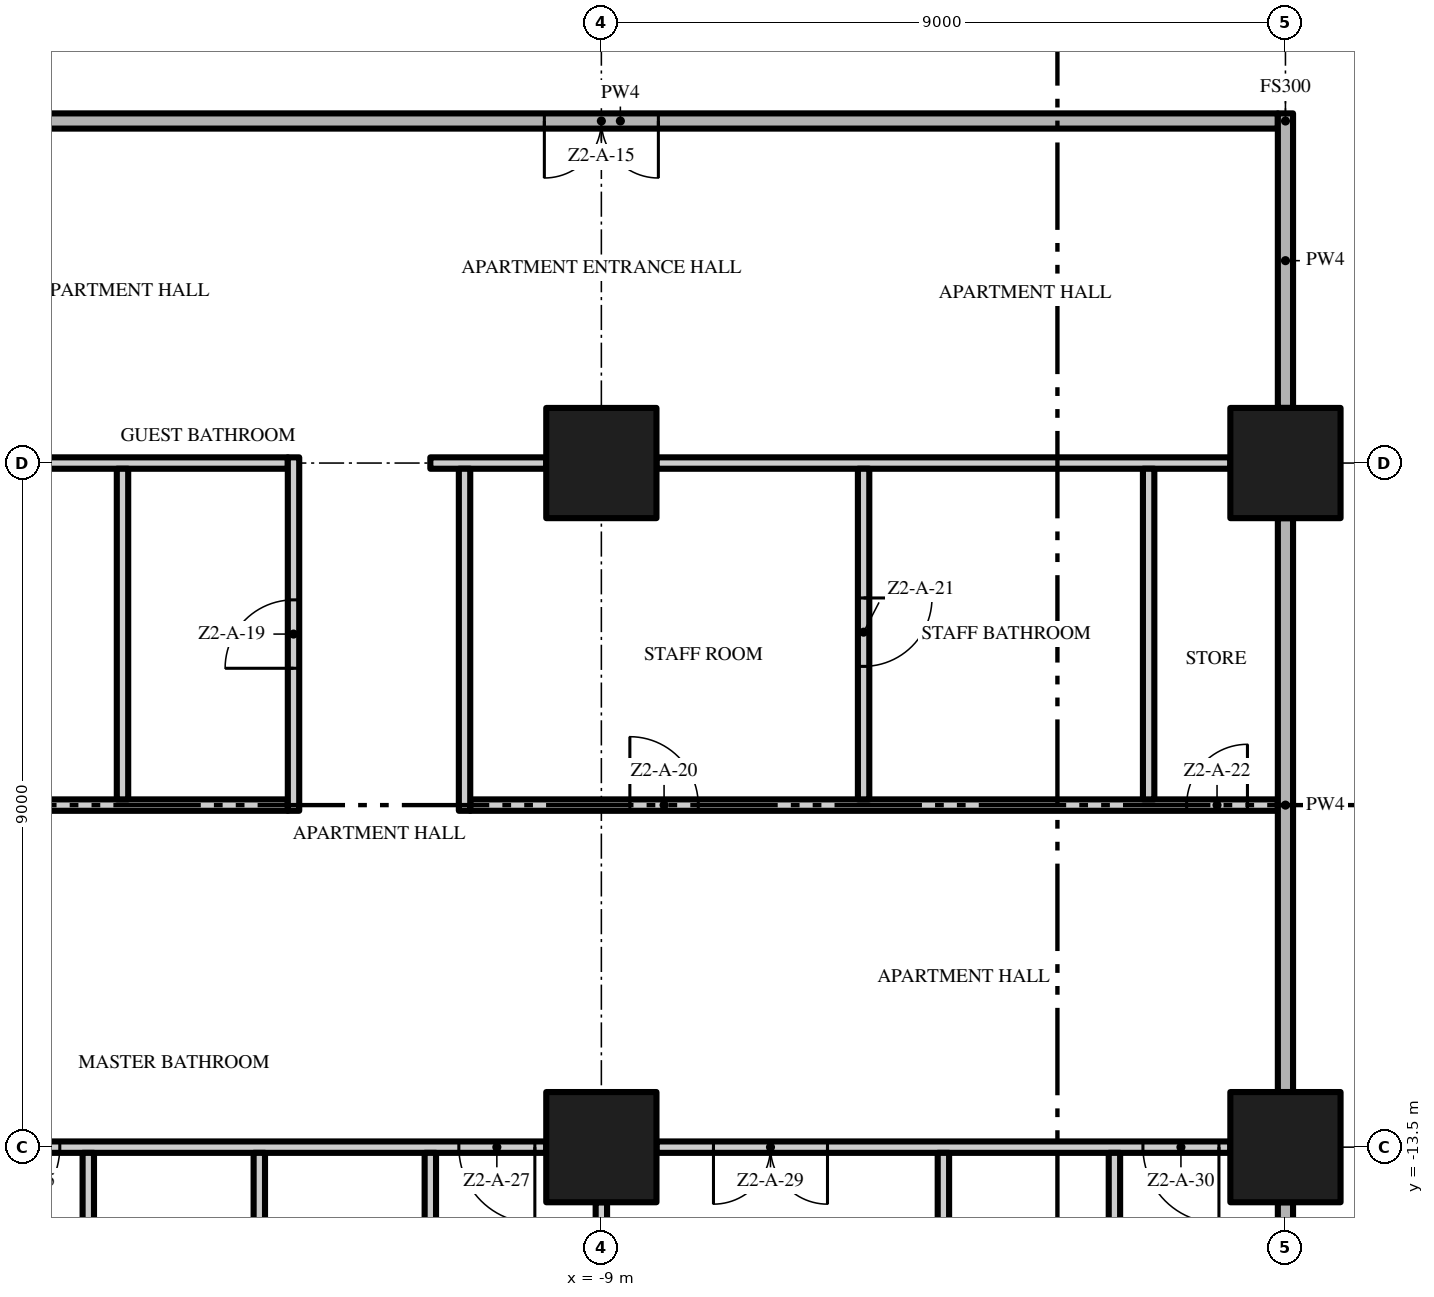
"""IFC4 building model, lengths in metres.
Left out: names, types, materials, properties, quantities, classifications, styles, units other than length and angle.
Written with IfcOpenShell. Run it as: python <this file> out.ifc"""

import sys

from ifc_helpers import new_model, si_unit, direction, frame, frame_2d, origin, origin_2d, place, context, subcontext, project, spatial, rectangle, extrude, element, fill, save


model = new_model("IFC4")
c1 = context("Model", 3, precision=1e-05, world=origin(), true_north=direction((0.0, 1.0)))
c2 = subcontext(c1, "Body", "Model", "MODEL_VIEW")
j1 = project(units=[si_unit("LENGTHUNIT", "METRE"), si_unit("PLANEANGLEUNIT", "RADIAN")], contexts=[c1])
p1 = place(None, origin())
s1 = spatial("IfcSite", under=j1, at=p1, CompositionType="ELEMENT")
p2 = place(p1, origin())
s2 = spatial("IfcBuilding", under=s1, at=p2, CompositionType="ELEMENT")
p3 = place(p2, frame((0.0, 0.0, 69.4)))
s3 = spatial("IfcBuildingStorey", under=s2, at=p3, CompositionType="ELEMENT", Elevation=69.4)
for number, where, z_axis, x_axis in (
    (1, (-9.0, -13.5, 0.0), (0.0, 0.0, 1.0), (1.0, 0.0, 0.0)),
    (2, (-9.0, -4.5, 0.0), (0.0, 0.0, 1.0), (1.0, 0.0, 0.0)),
    (3, (0.0, -13.5, 0.0), (0.0, 0.0, 1.0), (1.0, 0.0, 0.0)),
    (4, (0.0, -4.5, 0.0), (0.0, 0.0, 1.0), (1.0, 0.0, 0.0)),
):
    element("IfcColumn", number, at=place(p3, frame(where, z_axis=z_axis, x_axis=x_axis)), inside=s3, PredefinedType="COLUMN", context=c2, shape_type="SweptSolid", body=[
        extrude(rectangle(XDim=1.45, YDim=1.45, at=origin_2d()), origin(), (0.0, 0.0, 1.0), 3.5),
    ])
p4 = place(p3, frame((-9.725, -13.5, 0.0), z_axis=(0.0, 0.0, 1.0), x_axis=(-1.0, 0.0, 0.0)))
e5 = element("IfcWall", 5, at=p4, inside=s3, PredefinedType="PARTITIONING", context=c2, shape_type="SweptSolid", body=[
    extrude(rectangle(XDim=7.55, YDim=0.15, at=frame_2d((3.775, 0.0))), origin(), (0.0, 0.0, 1.0), 3.5),
])
p5 = place(p4, frame((6.4, 0.0, 0.0)))
e6 = element("IfcOpeningElement", 6, at=p5, cuts=e5, PredefinedType="OPENING", context=c2, shape_type="SweptSolid", body=[
    extrude(rectangle(XDim=1.0, YDim=2.4, at=frame_2d((0.5, 1.2))), frame((0.0, 0.085, 0.0), z_axis=(0.0, -1.0, 0.0), x_axis=(1.0, 0.0, 0.0)), (0.0, 0.0, 1.0), 0.17),
])
p6 = place(p4, frame((0.15, 0.0, 0.0)))
e7 = element("IfcOpeningElement", 7, at=p6, cuts=e5, PredefinedType="OPENING", context=c2, shape_type="SweptSolid", body=[
    extrude(rectangle(XDim=1.0, YDim=2.4, at=frame_2d((0.5, 1.2))), frame((0.0, 0.085, 0.0), z_axis=(0.0, -1.0, 0.0), x_axis=(1.0, 0.0, 0.0)), (0.0, 0.0, 1.0), 0.17),
])
p7 = place(p3, frame((-0.725, -13.5, 0.0), z_axis=(0.0, 0.0, 1.0), x_axis=(-1.0, 0.0, 0.0)))
e8 = element("IfcWall", 8, at=p7, inside=s3, PredefinedType="PARTITIONING", context=c2, shape_type="SweptSolid", body=[
    extrude(rectangle(XDim=7.55, YDim=0.15, at=frame_2d((3.775, 0.0))), origin(), (0.0, 0.0, 1.0), 3.5),
])
p8 = place(p7, frame((5.3, 0.0, 0.0)))
e9 = element("IfcOpeningElement", 9, at=p8, cuts=e8, PredefinedType="OPENING", context=c2, shape_type="SweptSolid", body=[
    extrude(rectangle(XDim=1.5, YDim=2.4, at=frame_2d((0.75, 1.2))), frame((0.0, 0.085, 0.0), z_axis=(0.0, -1.0, 0.0), x_axis=(1.0, 0.0, 0.0)), (0.0, 0.0, 1.0), 0.17),
])
p9 = place(p7, frame((0.15, 0.0, 0.0)))
e10 = element("IfcOpeningElement", 10, at=p9, cuts=e8, PredefinedType="OPENING", context=c2, shape_type="SweptSolid", body=[
    extrude(rectangle(XDim=1.0, YDim=2.4, at=frame_2d((0.5, 1.2))), frame((0.0, 0.085, 0.0), z_axis=(0.0, -1.0, 0.0), x_axis=(1.0, 0.0, 0.0)), (0.0, 0.0, 1.0), 0.17),
])
p10 = place(p3, frame((-26.7, -9.0, 0.0), z_axis=(0.0, 0.0, 1.0), x_axis=(1.0, 0.0, 0.0)))
e11 = element("IfcWall", 11, at=p10, inside=s3, PredefinedType="PARTITIONING", context=c2, shape_type="SweptSolid", body=[
    extrude(rectangle(XDim=13.575, YDim=0.15, at=frame_2d((6.787, 0.0))), origin(), (0.0, 0.0, 1.0), 3.5),
])
p11 = place(p3, frame((-10.725, -9.0, 0.0), z_axis=(0.0, 0.0, 1.0), x_axis=(1.0, 0.0, 0.0)))
e12 = element("IfcWall", 12, at=p11, inside=s3, PredefinedType="PARTITIONING", context=c2, shape_type="SweptSolid", body=[
    extrude(rectangle(XDim=10.625, YDim=0.15, at=frame_2d((5.312, 0.0))), origin(), (0.0, 0.0, 1.0), 3.5),
])
p12 = place(p11, frame((2.1, 0.0, 0.0)))
e13 = element("IfcOpeningElement", 13, at=p12, cuts=e12, PredefinedType="OPENING", context=c2, shape_type="SweptSolid", body=[
    extrude(rectangle(XDim=0.9, YDim=2.1, at=frame_2d((0.45, 1.05))), frame((0.0, 0.085, 0.0), z_axis=(0.0, -1.0, 0.0), x_axis=(1.0, 0.0, 0.0)), (0.0, 0.0, 1.0), 0.17),
])
p13 = place(p11, frame((9.425, 0.0, 0.0)))
e14 = element("IfcOpeningElement", 14, at=p13, cuts=e12, PredefinedType="OPENING", context=c2, shape_type="SweptSolid", body=[
    extrude(rectangle(XDim=0.8, YDim=2.0, at=frame_2d((0.4, 1.0))), frame((0.0, 0.085, 0.0), z_axis=(0.0, -1.0, 0.0), x_axis=(1.0, 0.0, 0.0)), (0.0, 0.0, 1.0), 0.17),
])
p14 = place(p3, frame((-17.275, -4.5, 0.0), z_axis=(0.0, 0.0, 1.0), x_axis=(1.0, 0.0, 0.0)))
e15 = element("IfcWall", 15, at=p14, inside=s3, PredefinedType="PARTITIONING", context=c2, shape_type="SweptSolid", body=[
    extrude(rectangle(XDim=4.15, YDim=0.15, at=frame_2d((2.075, 0.0))), origin(), (0.0, 0.0, 1.0), 3.5),
])
p15 = place(p3, frame((-11.25, -4.5, 0.0), z_axis=(0.0, 0.0, 1.0), x_axis=(1.0, 0.0, 0.0)))
e16 = element("IfcWall", 16, at=p15, inside=s3, PredefinedType="PARTITIONING", context=c2, shape_type="SweptSolid", body=[
    extrude(rectangle(XDim=1.525, YDim=0.15, at=frame_2d((0.762, 0.0))), origin(), (0.0, 0.0, 1.0), 3.5),
])
p16 = place(p3, frame((-8.275, -4.5, 0.0), z_axis=(0.0, 0.0, 1.0), x_axis=(1.0, 0.0, 0.0)))
e17 = element("IfcWall", 17, at=p16, inside=s3, PredefinedType="PARTITIONING", context=c2, shape_type="SweptSolid", body=[
    extrude(rectangle(XDim=7.55, YDim=0.15, at=frame_2d((3.775, 0.0))), origin(), (0.0, 0.0, 1.0), 3.5),
])
p17 = place(p3, frame((-0.1, 0.0, 0.0), z_axis=(0.0, 0.0, 1.0), x_axis=(-1.0, 0.0, 0.0)))
e18 = element("IfcWall", 18, at=p17, inside=s3, PredefinedType="PARTITIONING", context=c2, shape_type="SweptSolid", body=[
    extrude(rectangle(XDim=17.3, YDim=0.2, at=frame_2d((8.65, 0.0))), origin(), (0.0, 0.0, 1.0), 3.5),
])
p18 = place(p17, frame((8.15, 0.0, 0.0)))
e19 = element("IfcOpeningElement", 19, at=p18, cuts=e18, PredefinedType="OPENING", context=c2, shape_type="SweptSolid", body=[
    extrude(rectangle(XDim=1.5, YDim=2.4, at=frame_2d((0.75, 1.2))), frame((0.0, 0.11, 0.0), z_axis=(0.0, -1.0, 0.0), x_axis=(1.0, 0.0, 0.0)), (0.0, 0.0, 1.0), 0.22),
])
p19 = place(p3, frame((-15.75, -16.575, 0.0), z_axis=(0.0, 0.0, 1.0), x_axis=(0.0, 1.0, 0.0)))
e20 = element("IfcWall", 20, at=p19, inside=s3, PredefinedType="PARTITIONING", context=c2, shape_type="SweptSolid", body=[
    extrude(rectangle(XDim=3.0, YDim=0.15, at=frame_2d((1.5, 0.0))), origin(), (0.0, 0.0, 1.0), 3.5),
])
p20 = place(p3, frame((-15.3, -8.925, 0.0), z_axis=(0.0, 0.0, 1.0), x_axis=(0.0, 1.0, 0.0)))
e21 = element("IfcWall", 21, at=p20, inside=s3, PredefinedType="PARTITIONING", context=c2, shape_type="SweptSolid", body=[
    extrude(rectangle(XDim=4.35, YDim=0.15, at=frame_2d((2.175, 0.0))), origin(), (0.0, 0.0, 1.0), 3.5),
])
p21 = place(p3, frame((-13.5, -22.2, 0.0), z_axis=(0.0, 0.0, 1.0), x_axis=(0.0, 1.0, 0.0)))
e22 = element("IfcWall", 22, at=p21, inside=s3, PredefinedType="PARTITIONING", context=c2, shape_type="SweptSolid", body=[
    extrude(rectangle(XDim=8.625, YDim=0.15, at=frame_2d((4.312, 0.0))), origin(), (0.0, 0.0, 1.0), 3.5),
])
p22 = place(p3, frame((-13.05, -9.075, 0.0), z_axis=(0.0, 0.0, 1.0), x_axis=(0.0, 1.0, 0.0)))
e23 = element("IfcWall", 23, at=p22, inside=s3, PredefinedType="PARTITIONING", context=c2, shape_type="SweptSolid", body=[
    extrude(rectangle(XDim=4.65, YDim=0.15, at=frame_2d((2.325, 0.0))), origin(), (0.0, 0.0, 1.0), 3.5),
])
p23 = place(p22, frame((1.875, 0.0, 0.0)))
e24 = element("IfcOpeningElement", 24, at=p23, cuts=e23, PredefinedType="OPENING", context=c2, shape_type="SweptSolid", body=[
    extrude(rectangle(XDim=0.9, YDim=2.1, at=frame_2d((0.45, 1.05))), frame((0.0, 0.085, 0.0), z_axis=(0.0, -1.0, 0.0), x_axis=(1.0, 0.0, 0.0)), (0.0, 0.0, 1.0), 0.17),
])
p24 = place(p3, frame((-11.25, -16.575, 0.0), z_axis=(0.0, 0.0, 1.0), x_axis=(0.0, 1.0, 0.0)))
e25 = element("IfcWall", 25, at=p24, inside=s3, PredefinedType="PARTITIONING", context=c2, shape_type="SweptSolid", body=[
    extrude(rectangle(XDim=3.0, YDim=0.15, at=frame_2d((1.5, 0.0))), origin(), (0.0, 0.0, 1.0), 3.5),
])
p25 = place(p3, frame((-10.8, -9.075, 0.0), z_axis=(0.0, 0.0, 1.0), x_axis=(0.0, 1.0, 0.0)))
e26 = element("IfcWall", 26, at=p25, inside=s3, PredefinedType="PARTITIONING", context=c2, shape_type="SweptSolid", body=[
    extrude(rectangle(XDim=4.5, YDim=0.15, at=frame_2d((2.25, 0.0))), origin(), (0.0, 0.0, 1.0), 3.5),
])
p26 = place(p3, frame((-9.0, -21.15, 0.0), z_axis=(0.0, 0.0, 1.0), x_axis=(0.0, 1.0, 0.0)))
e27 = element("IfcWall", 27, at=p26, inside=s3, PredefinedType="PARTITIONING", context=c2, shape_type="SweptSolid", body=[
    extrude(rectangle(XDim=6.925, YDim=0.15, at=frame_2d((3.462, 0.0))), origin(), (0.0, 0.0, 1.0), 3.5),
])
p27 = place(p3, frame((-5.55, -4.575, 0.0), z_axis=(0.0, 0.0, 1.0), x_axis=(0.0, -1.0, 0.0)))
e28 = element("IfcWall", 28, at=p27, inside=s3, PredefinedType="PARTITIONING", context=c2, shape_type="SweptSolid", body=[
    extrude(rectangle(XDim=4.35, YDim=0.15, at=frame_2d((2.175, 0.0))), origin(), (0.0, 0.0, 1.0), 3.5),
])
p28 = place(p27, frame((1.7, 0.0, 0.0)))
e29 = element("IfcOpeningElement", 29, at=p28, cuts=e28, PredefinedType="OPENING", context=c2, shape_type="SweptSolid", body=[
    extrude(rectangle(XDim=0.9, YDim=2.1, at=frame_2d((0.45, 1.05))), frame((0.0, 0.085, 0.0), z_axis=(0.0, -1.0, 0.0), x_axis=(1.0, 0.0, 0.0)), (0.0, 0.0, 1.0), 0.17),
])
p29 = place(p3, frame((-4.5, -22.2, 0.0), z_axis=(0.0, 0.0, 1.0), x_axis=(0.0, 1.0, 0.0)))
e30 = element("IfcWall", 30, at=p29, inside=s3, PredefinedType="PARTITIONING", context=c2, shape_type="SweptSolid", body=[
    extrude(rectangle(XDim=8.625, YDim=0.15, at=frame_2d((4.312, 0.0))), origin(), (0.0, 0.0, 1.0), 3.5),
])
p30 = place(p3, frame((-2.25, -16.575, 0.0), z_axis=(0.0, 0.0, 1.0), x_axis=(0.0, 1.0, 0.0)))
e31 = element("IfcWall", 31, at=p30, inside=s3, PredefinedType="PARTITIONING", context=c2, shape_type="SweptSolid", body=[
    extrude(rectangle(XDim=3.0, YDim=0.15, at=frame_2d((1.5, 0.0))), origin(), (0.0, 0.0, 1.0), 3.5),
])
p31 = place(p3, frame((-1.8, -8.925, 0.0), z_axis=(0.0, 0.0, 1.0), x_axis=(0.0, 1.0, 0.0)))
e32 = element("IfcWall", 32, at=p31, inside=s3, PredefinedType="PARTITIONING", context=c2, shape_type="SweptSolid", body=[
    extrude(rectangle(XDim=4.35, YDim=0.15, at=frame_2d((2.175, 0.0))), origin(), (0.0, 0.0, 1.0), 3.5),
])
p32 = place(p3, frame((0.0, -21.15, 0.0), z_axis=(0.0, 0.0, 1.0), x_axis=(0.0, 1.0, 0.0)))
e33 = element("IfcWall", 33, at=p32, inside=s3, PredefinedType="PARTITIONING", context=c2, shape_type="SweptSolid", body=[
    extrude(rectangle(XDim=6.925, YDim=0.2, at=frame_2d((3.462, 0.0))), origin(), (0.0, 0.0, 1.0), 3.5),
])
p33 = place(p3, frame((0.0, -12.775, 0.0), z_axis=(0.0, 0.0, 1.0), x_axis=(0.0, 1.0, 0.0)))
e34 = element("IfcWall", 34, at=p33, inside=s3, PredefinedType="PARTITIONING", context=c2, shape_type="SweptSolid", body=[
    extrude(rectangle(XDim=7.55, YDim=0.2, at=frame_2d((3.775, 0.0))), origin(), (0.0, 0.0, 1.0), 3.5),
])
p34 = place(p3, frame((0.0, -3.775, 0.0), z_axis=(0.0, 0.0, 1.0), x_axis=(0.0, 1.0, 0.0)))
e35 = element("IfcWall", 35, at=p34, inside=s3, PredefinedType="PARTITIONING", context=c2, shape_type="SweptSolid", body=[
    extrude(rectangle(XDim=3.875, YDim=0.2, at=frame_2d((1.938, 0.0))), origin(), (0.0, 0.0, 1.0), 3.5),
])
p35 = place(p18, origin())
e36 = element("IfcDoor", 36, at=p35, inside=s3, OperationType="DOUBLE_DOOR_SINGLE_SWING", PredefinedType="DOOR", context=c2, shape_type="SweptSolid", body=[
    extrude(rectangle(XDim=1.5, YDim=2.4, at=frame_2d((0.75, 1.2))), frame((0.0, 0.025, 0.0), z_axis=(0.0, -1.0, 0.0), x_axis=(1.0, 0.0, 0.0)), (0.0, 0.0, 1.0), 0.05),
])
fill(e19, e36)
p36 = place(p23, origin())
e37 = element("IfcDoor", 37, at=p36, inside=s3, OperationType="SINGLE_SWING_LEFT", PredefinedType="DOOR", context=c2, shape_type="SweptSolid", body=[
    extrude(rectangle(XDim=0.9, YDim=2.1, at=frame_2d((0.45, 1.05))), frame((0.0, 0.025, 0.0), z_axis=(0.0, -1.0, 0.0), x_axis=(1.0, 0.0, 0.0)), (0.0, 0.0, 1.0), 0.05),
])
fill(e24, e37)
p37 = place(p12, origin())
e38 = element("IfcDoor", 38, at=p37, inside=s3, OperationType="SINGLE_SWING_LEFT", PredefinedType="DOOR", context=c2, shape_type="SweptSolid", body=[
    extrude(rectangle(XDim=0.9, YDim=2.1, at=frame_2d((0.45, 1.05))), frame((0.0, 0.025, 0.0), z_axis=(0.0, -1.0, 0.0), x_axis=(1.0, 0.0, 0.0)), (0.0, 0.0, 1.0), 0.05),
])
fill(e13, e38)
p38 = place(p28, origin())
e39 = element("IfcDoor", 39, at=p38, inside=s3, OperationType="SINGLE_SWING_LEFT", PredefinedType="DOOR", context=c2, shape_type="SweptSolid", body=[
    extrude(rectangle(XDim=0.9, YDim=2.1, at=frame_2d((0.45, 1.05))), frame((0.0, 0.025, 0.0), z_axis=(0.0, -1.0, 0.0), x_axis=(1.0, 0.0, 0.0)), (0.0, 0.0, 1.0), 0.05),
])
fill(e29, e39)
p39 = place(p13, origin())
e40 = element("IfcDoor", 40, at=p39, inside=s3, OperationType="SINGLE_SWING_RIGHT", PredefinedType="DOOR", context=c2, shape_type="SweptSolid", body=[
    extrude(rectangle(XDim=0.8, YDim=2.0, at=frame_2d((0.4, 1.0))), frame((0.0, 0.025, 0.0), z_axis=(0.0, -1.0, 0.0), x_axis=(1.0, 0.0, 0.0)), (0.0, 0.0, 1.0), 0.05),
])
fill(e14, e40)
p40 = place(p5, origin())
e41 = element("IfcDoor", 41, at=p40, inside=s3, OperationType="SINGLE_SWING_RIGHT", PredefinedType="DOOR", context=c2, shape_type="SweptSolid", body=[
    extrude(rectangle(XDim=1.0, YDim=2.4, at=frame_2d((0.5, 1.2))), frame((0.0, 0.025, 0.0), z_axis=(0.0, -1.0, 0.0), x_axis=(1.0, 0.0, 0.0)), (0.0, 0.0, 1.0), 0.05),
])
fill(e6, e41)
p41 = place(p6, origin())
e42 = element("IfcDoor", 42, at=p41, inside=s3, OperationType="SINGLE_SWING_LEFT", PredefinedType="DOOR", context=c2, shape_type="SweptSolid", body=[
    extrude(rectangle(XDim=1.0, YDim=2.4, at=frame_2d((0.5, 1.2))), frame((0.0, 0.025, 0.0), z_axis=(0.0, -1.0, 0.0), x_axis=(1.0, 0.0, 0.0)), (0.0, 0.0, 1.0), 0.05),
])
fill(e7, e42)
p42 = place(p8, origin())
e43 = element("IfcDoor", 43, at=p42, inside=s3, OperationType="DOUBLE_DOOR_SINGLE_SWING", PredefinedType="DOOR", context=c2, shape_type="SweptSolid", body=[
    extrude(rectangle(XDim=1.5, YDim=2.4, at=frame_2d((0.75, 1.2))), frame((0.0, 0.025, 0.0), z_axis=(0.0, -1.0, 0.0), x_axis=(1.0, 0.0, 0.0)), (0.0, 0.0, 1.0), 0.05),
])
fill(e9, e43)
p43 = place(p9, origin())
e44 = element("IfcDoor", 44, at=p43, inside=s3, OperationType="SINGLE_SWING_LEFT", PredefinedType="DOOR", context=c2, shape_type="SweptSolid", body=[
    extrude(rectangle(XDim=1.0, YDim=2.4, at=frame_2d((0.5, 1.2))), frame((0.0, 0.025, 0.0), z_axis=(0.0, -1.0, 0.0), x_axis=(1.0, 0.0, 0.0)), (0.0, 0.0, 1.0), 0.05),
])
fill(e10, e44)
save(model, sys.argv[1])
